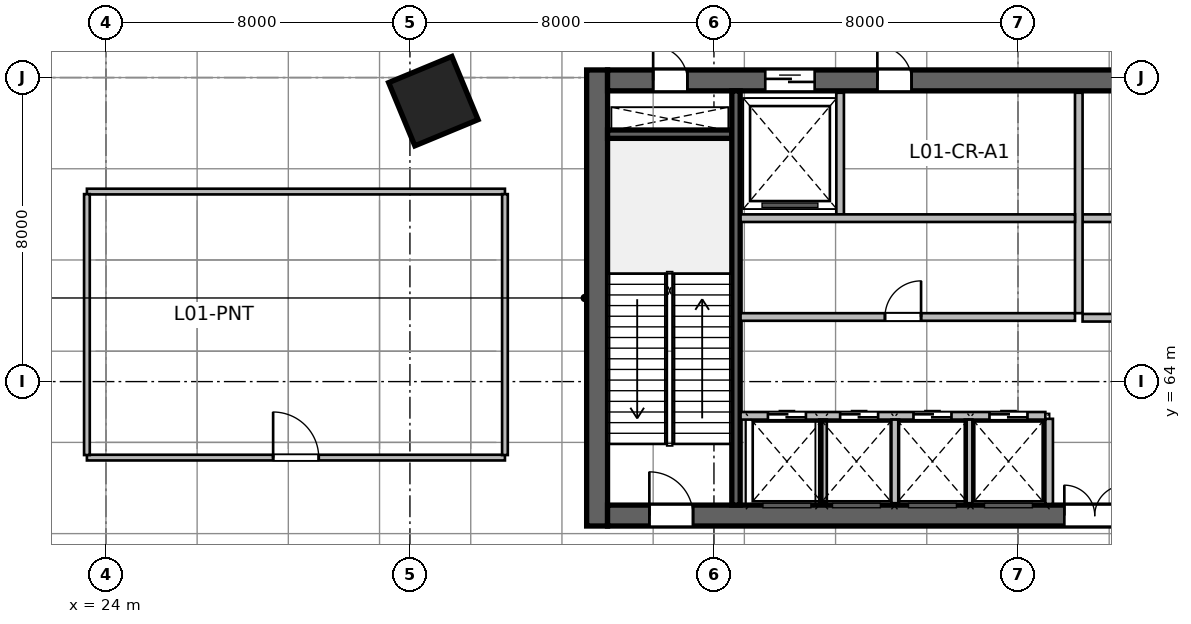
"""IFC4 building model, lengths in metres.
Left out: names, types, materials, properties, quantities, classifications, styles, units other than length and angle.
Written with IfcOpenShell. Run it as: python <this file> out.ifc"""

import sys

from ifc_helpers import new_model, si_unit, direction, frame, frame_2d, origin, origin_2d, place, context, subcontext, project, spatial, rectangle, extrude, source, transform, mapped, element, fill, save


model = new_model("IFC4")
c1 = context("Model", 3, precision=1e-05, world=origin(), true_north=direction((0.0, 1.0)))
c2 = subcontext(c1, "Body", "Model", "MODEL_VIEW")
j1 = project(units=[si_unit("LENGTHUNIT", "METRE"), si_unit("PLANEANGLEUNIT", "RADIAN")], contexts=[c1])
p1 = place(None, origin())
s1 = spatial("IfcSite", under=j1, at=p1, CompositionType="ELEMENT")
p2 = place(p1, origin())
s2 = spatial("IfcBuilding", under=s1, at=p2, CompositionType="ELEMENT")
p3 = place(p2, frame((0.0, 0.0, 6.0)))
s3 = spatial("IfcBuildingStorey", under=s2, at=p3, CompositionType="ELEMENT", Elevation=6.0)
m1 = source(origin(), c2, "Body", "SweptSolid", [
    extrude(rectangle(XDim=12.0, YDim=0.55, at=frame_2d((6.0, 0.0))), origin(), (0.0, 0.0, 1.0), 6.0),
])
p4 = place(p3, frame((36.925, 60.2, 0.0), z_axis=(0.0, 0.0, 1.0), x_axis=(0.0, 1.0, 0.0)))
e1 = element("IfcWall", 1, at=p4, inside=s3, PredefinedType="SHEAR", context=c2, shape_type="MappedRepresentation", body=[
    mapped(m1, transform((0.0, 0.0, 0.0), scale=1.0)),
])
m2 = source(origin(), c2, "Body", "SweptSolid", [
    extrude(rectangle(XDim=21.6, YDim=0.55, at=frame_2d((10.8, 0.0))), origin(), (0.0, 0.0, 1.0), 6.0),
])
p5 = place(p3, frame((37.2, 60.475, 0.0), z_axis=(0.0, 0.0, 1.0), x_axis=(1.0, 0.0, 0.0)))
e2 = element("IfcWall", 2, at=p5, inside=s3, PredefinedType="SHEAR", context=c2, shape_type="MappedRepresentation", body=[
    mapped(m2, transform((0.0, 0.0, 0.0), scale=1.0)),
])
p6 = place(p5, frame((1.1, 0.0, 0.0)))
e3 = element("IfcOpeningElement", 3, at=p6, cuts=e2, PredefinedType="OPENING", context=c2, shape_type="SweptSolid", body=[
    extrude(rectangle(XDim=1.15, YDim=2.15, at=frame_2d((0.575, 1.075))), frame((0.0, 0.285, 0.0), z_axis=(0.0, -1.0, 0.0), x_axis=(1.0, 0.0, 0.0)), (0.0, 0.0, 1.0), 0.57),
])
p7 = place(p5, frame((19.5, 0.0, 0.0)))
e4 = element("IfcOpeningElement", 4, at=p7, cuts=e2, PredefinedType="OPENING", context=c2, shape_type="SweptSolid", body=[
    extrude(rectangle(XDim=0.9, YDim=2.1, at=frame_2d((0.45, 1.05))), frame((0.0, 0.285, 0.0), z_axis=(0.0, -1.0, 0.0), x_axis=(1.0, 0.0, 0.0)), (0.0, 0.0, 1.0), 0.57),
])
p8 = place(p5, frame((12.02, 0.0, 0.0)))
e5 = element("IfcOpeningElement", 5, at=p8, cuts=e2, PredefinedType="OPENING", context=c2, shape_type="SweptSolid", body=[
    extrude(rectangle(XDim=1.6, YDim=2.15, at=frame_2d((0.8, 1.075))), frame((0.0, 0.285, 0.0), z_axis=(0.0, -1.0, 0.0), x_axis=(1.0, 0.0, 0.0)), (0.0, 0.0, 1.0), 0.57),
])
p9 = place(p3, frame((37.2, 71.925, 0.0), z_axis=(0.0, 0.0, 1.0), x_axis=(1.0, 0.0, 0.0)))
e6 = element("IfcWall", 6, at=p9, inside=s3, PredefinedType="SHEAR", context=c2, shape_type="MappedRepresentation", body=[
    mapped(m2, transform((0.0, 0.0, 0.0), scale=1.0)),
])
p10 = place(p9, frame((1.2, 0.0, 0.0)))
e7 = element("IfcOpeningElement", 7, at=p10, cuts=e6, PredefinedType="OPENING", context=c2, shape_type="SweptSolid", body=[
    extrude(rectangle(XDim=0.9, YDim=2.1, at=frame_2d((0.45, 1.05))), frame((0.0, 0.285, 0.0), z_axis=(0.0, -1.0, 0.0), x_axis=(1.0, 0.0, 0.0)), (0.0, 0.0, 1.0), 0.57),
])
p11 = place(p9, frame((14.7, 0.0, 0.0)))
e8 = element("IfcOpeningElement", 8, at=p11, cuts=e6, PredefinedType="OPENING", context=c2, shape_type="SweptSolid", body=[
    extrude(rectangle(XDim=1.2, YDim=2.15, at=frame_2d((0.6, 1.075))), frame((0.0, 0.285, 0.0), z_axis=(0.0, -1.0, 0.0), x_axis=(1.0, 0.0, 0.0)), (0.0, 0.0, 1.0), 0.57),
])
p12 = place(p9, frame((4.15, 0.0, 0.0)))
e9 = element("IfcOpeningElement", 9, at=p12, cuts=e6, PredefinedType="OPENING", context=c2, shape_type="SweptSolid", body=[
    extrude(rectangle(XDim=1.3, YDim=2.15, at=frame_2d((0.65, 1.075))), frame((0.0, 0.285, 0.0), z_axis=(0.0, -1.0, 0.0), x_axis=(1.0, 0.0, 0.0)), (0.0, 0.0, 1.0), 0.57),
])
p13 = place(p9, frame((7.1, 0.0, 0.0)))
e10 = element("IfcOpeningElement", 10, at=p13, cuts=e6, PredefinedType="OPENING", context=c2, shape_type="SweptSolid", body=[
    extrude(rectangle(XDim=0.9, YDim=2.1, at=frame_2d((0.45, 1.05))), frame((0.0, 0.285, 0.0), z_axis=(0.0, -1.0, 0.0), x_axis=(1.0, 0.0, 0.0)), (0.0, 0.0, 1.0), 0.57),
])
m3 = source(origin(), c2, "Body", "SweptSolid", [
    extrude(rectangle(XDim=3.27, YDim=0.22, at=frame_2d((1.635, 0.0))), origin(), (0.0, 0.0, 1.0), 6.0),
])
p14 = place(p3, frame((37.2, 70.51, 0.0), z_axis=(0.0, 0.0, 1.0), x_axis=(1.0, 0.0, 0.0)))
e11 = element("IfcWall", 11, at=p14, inside=s3, PredefinedType="SHEAR", context=c2, shape_type="MappedRepresentation", body=[
    mapped(m3, transform((0.0, 0.0, 0.0), scale=1.0)),
])
m4 = source(origin(), c2, "Body", "SweptSolid", [
    extrude(rectangle(XDim=10.9, YDim=0.22, at=frame_2d((5.45, 0.0))), origin(), (0.0, 0.0, 1.0), 6.0),
])
p15 = place(p3, frame((40.58, 60.75, 0.0), z_axis=(0.0, 0.0, 1.0), x_axis=(0.0, 1.0, 0.0)))
e12 = element("IfcWall", 12, at=p15, inside=s3, PredefinedType="SHEAR", context=c2, shape_type="MappedRepresentation", body=[
    mapped(m4, transform((0.0, 0.0, 0.0), scale=1.0)),
])
m5 = source(origin(), c2, "Body", "SweptSolid", [
    extrude(rectangle(XDim=1.8, YDim=1.8, at=origin_2d()), origin(), (0.0, 0.0, 1.0), 6.0),
])
p16 = place(p3, frame((32.616, 71.379, 0.0), z_axis=(0.0, 0.0, 1.0), x_axis=(-0.382683432365, 0.923879532511, 0.0)))
e13 = element("IfcColumn", 13, at=p16, inside=s3, PredefinedType="COLUMN", context=c2, shape_type="MappedRepresentation", body=[
    mapped(m5, transform((0.0, 0.0, 0.0), scale=1.0)),
])
m6 = source(origin(), c2, "Body", "SweptSolid", [
    extrude(rectangle(XDim=5.667, YDim=0.35, at=frame_2d((2.833, 0.0))), origin(), (0.0, 0.0, 1.0), 5.7),
])
p17 = place(p3, frame((25.25, 74.909, 0.0), z_axis=(0.0, 0.0, 1.0), x_axis=(-0.873233089296, -0.487302751642, 0.0)))
e14 = element("IfcWall", 14, at=p17, inside=s3, PredefinedType="SOLIDWALL", context=c2, shape_type="MappedRepresentation", body=[
    mapped(m6, transform((0.0, 0.0, 0.0), scale=1.0)),
])
p18 = place(p17, frame((1.033, 0.0, 1.05)))
e15 = element("IfcOpeningElement", 15, at=p18, cuts=e14, PredefinedType="OPENING", context=c2, shape_type="SweptSolid", body=[
    extrude(rectangle(XDim=3.6, YDim=2.8, at=frame_2d((1.8, 1.4))), frame((0.0, 0.185, 0.0), z_axis=(0.0, -1.0, 0.0), x_axis=(1.0, 0.0, 0.0)), (0.0, 0.0, 1.0), 0.37),
])
m7 = source(origin(), c2, "Body", "SweptSolid", [
    extrude(rectangle(XDim=2.24, YDim=0.2, at=frame_2d((1.12, 0.0))), origin(), (0.0, 0.0, 1.0), 5.7),
])
p19 = place(p3, frame((48.82, 60.78, 0.0), z_axis=(0.0, 0.0, 1.0), x_axis=(0.0, 1.0, 0.0)))
e16 = element("IfcWall", 16, at=p19, inside=s3, PredefinedType="SOLIDWALL", context=c2, shape_type="MappedRepresentation", body=[
    mapped(m7, transform((0.0, 0.0, 0.0), scale=1.0)),
])
m8 = source(origin(), c2, "Body", "SweptSolid", [
    extrude(rectangle(XDim=5.62, YDim=0.2, at=frame_2d((2.81, 0.0))), origin(), (0.0, 0.0, 1.0), 5.7),
])
p20 = place(p3, frame((49.7, 68.3, 0.0), z_axis=(0.0, 0.0, 1.0), x_axis=(1.0, 0.0, 0.0)))
e17 = element("IfcWall", 17, at=p20, inside=s3, PredefinedType="SOLIDWALL", context=c2, shape_type="MappedRepresentation", body=[
    mapped(m8, transform((0.0, 0.0, 0.0), scale=1.0)),
])
p21 = place(p20, frame((1.6, 0.0, 0.0)))
e18 = element("IfcOpeningElement", 18, at=p21, cuts=e17, PredefinedType="OPENING", context=c2, shape_type="SweptSolid", body=[
    extrude(rectangle(XDim=1.1, YDim=2.15, at=frame_2d((0.55, 1.075))), frame((0.0, 0.11, 0.0), z_axis=(0.0, -1.0, 0.0), x_axis=(1.0, 0.0, 0.0)), (0.0, 0.0, 1.0), 0.22),
])
p22 = place(p20, frame((3.7, 0.0, 0.0)))
e19 = element("IfcOpeningElement", 19, at=p22, cuts=e17, PredefinedType="OPENING", context=c2, shape_type="SweptSolid", body=[
    extrude(rectangle(XDim=1.1, YDim=2.15, at=frame_2d((0.55, 1.075))), frame((0.0, 0.11, 0.0), z_axis=(0.0, -1.0, 0.0), x_axis=(1.0, 0.0, 0.0)), (0.0, 0.0, 1.0), 0.22),
])
m9 = source(origin(), c2, "Body", "SweptSolid", [
    extrude(rectangle(XDim=5.8, YDim=0.2, at=frame_2d((2.9, 0.0))), origin(), (0.0, 0.0, 1.0), 5.7),
])
p23 = place(p3, frame((49.6, 65.8, 0.0), z_axis=(0.0, 0.0, 1.0), x_axis=(0.0, 1.0, 0.0)))
e20 = element("IfcWall", 20, at=p23, inside=s3, PredefinedType="SOLIDWALL", context=c2, shape_type="MappedRepresentation", body=[
    mapped(m9, transform((0.0, 0.0, 0.0), scale=1.0)),
])
p24 = place(p3, frame((49.7, 65.68, 0.0), z_axis=(0.0, 0.0, 1.0), x_axis=(1.0, 0.0, 0.0)))
e21 = element("IfcWall", 21, at=p24, inside=s3, PredefinedType="SOLIDWALL", context=c2, shape_type="MappedRepresentation", body=[
    mapped(m8, transform((0.0, 0.0, 0.0), scale=1.0)),
])
m10 = source(origin(), c2, "Body", "SweptSolid", [
    extrude(rectangle(XDim=3.2, YDim=0.2, at=frame_2d((1.6, 0.0))), origin(), (0.0, 0.0, 1.0), 5.7),
])
p25 = place(p3, frame((43.32, 68.4, 0.0), z_axis=(0.0, 0.0, 1.0), x_axis=(0.0, 1.0, 0.0)))
e22 = element("IfcWall", 22, at=p25, inside=s3, PredefinedType="SOLIDWALL", context=c2, shape_type="MappedRepresentation", body=[
    mapped(m10, transform((0.0, 0.0, 0.0), scale=1.0)),
])
m11 = source(origin(), c2, "Body", "SweptSolid", [
    extrude(rectangle(XDim=8.8, YDim=0.2, at=frame_2d((4.4, 0.0))), origin(), (0.0, 0.0, 1.0), 5.7),
])
p26 = place(p3, frame((40.7, 68.3, 0.0), z_axis=(0.0, 0.0, 1.0), x_axis=(1.0, 0.0, 0.0)))
e23 = element("IfcWall", 23, at=p26, inside=s3, PredefinedType="SOLIDWALL", context=c2, shape_type="MappedRepresentation", body=[
    mapped(m11, transform((0.0, 0.0, 0.0), scale=1.0)),
])
m12 = source(origin(), c2, "Body", "SweptSolid", [
    extrude(rectangle(XDim=8.02, YDim=0.2, at=frame_2d((4.01, 0.0))), origin(), (0.0, 0.0, 1.0), 5.7),
])
p27 = place(p3, frame((40.7, 63.1, 0.0), z_axis=(0.0, 0.0, 1.0), x_axis=(1.0, 0.0, 0.0)))
e24 = element("IfcWall", 24, at=p27, inside=s3, PredefinedType="SOLIDWALL", context=c2, shape_type="MappedRepresentation", body=[
    mapped(m12, transform((0.0, 0.0, 0.0), scale=1.0)),
])
p28 = place(p27, frame((0.72, 0.0, 0.0)))
e25 = element("IfcOpeningElement", 25, at=p28, cuts=e24, PredefinedType="OPENING", context=c2, shape_type="SweptSolid", body=[
    extrude(rectangle(XDim=1.0, YDim=2.15, at=frame_2d((0.5, 1.075))), frame((0.0, 0.11, 0.0), z_axis=(0.0, -1.0, 0.0), x_axis=(1.0, 0.0, 0.0)), (0.0, 0.0, 1.0), 0.22),
])
p29 = place(p27, frame((2.62, 0.0, 0.0)))
e26 = element("IfcOpeningElement", 26, at=p29, cuts=e24, PredefinedType="OPENING", context=c2, shape_type="SweptSolid", body=[
    extrude(rectangle(XDim=1.0, YDim=2.15, at=frame_2d((0.5, 1.075))), frame((0.0, 0.11, 0.0), z_axis=(0.0, -1.0, 0.0), x_axis=(1.0, 0.0, 0.0)), (0.0, 0.0, 1.0), 0.22),
])
p30 = place(p27, frame((4.55, 0.0, 0.0)))
e27 = element("IfcOpeningElement", 27, at=p30, cuts=e24, PredefinedType="OPENING", context=c2, shape_type="SweptSolid", body=[
    extrude(rectangle(XDim=1.0, YDim=2.15, at=frame_2d((0.5, 1.075))), frame((0.0, 0.11, 0.0), z_axis=(0.0, -1.0, 0.0), x_axis=(1.0, 0.0, 0.0)), (0.0, 0.0, 1.0), 0.22),
])
p31 = place(p27, frame((6.55, 0.0, 0.0)))
e28 = element("IfcOpeningElement", 28, at=p31, cuts=e24, PredefinedType="OPENING", context=c2, shape_type="SweptSolid", body=[
    extrude(rectangle(XDim=1.0, YDim=2.15, at=frame_2d((0.5, 1.075))), frame((0.0, 0.11, 0.0), z_axis=(0.0, -1.0, 0.0), x_axis=(1.0, 0.0, 0.0)), (0.0, 0.0, 1.0), 0.22),
])
m13 = source(origin(), c2, "Body", "SweptSolid", [
    extrude(rectangle(XDim=2.2, YDim=0.2, at=frame_2d((1.1, 0.0))), origin(), (0.0, 0.0, 1.0), 5.7),
])
for number, where, z_axis, x_axis in (
    (29, (42.87, 60.8, 0.0), (0.0, 0.0, 1.0), (0.0, 1.0, 0.0)),
    (30, (44.77, 60.8, 0.0), (0.0, 0.0, 1.0), (0.0, 1.0, 0.0)),
    (31, (46.7, 60.8, 0.0), (0.0, 0.0, 1.0), (0.0, 1.0, 0.0)),
):
    element("IfcWall", number, at=place(p3, frame(where, z_axis=z_axis, x_axis=x_axis)), inside=s3, PredefinedType="SOLIDWALL", context=c2, shape_type="MappedRepresentation", body=[
        mapped(m13, transform((0.0, 0.0, 0.0), scale=1.0)),
    ])
p32 = place(p3, frame((40.7, 65.7, 0.0), z_axis=(0.0, 0.0, 1.0), x_axis=(1.0, 0.0, 0.0)))
e32 = element("IfcWall", 32, at=p32, inside=s3, PredefinedType="SOLIDWALL", context=c2, shape_type="MappedRepresentation", body=[
    mapped(m11, transform((0.0, 0.0, 0.0), scale=1.0)),
])
p33 = place(p32, frame((3.8, 0.0, 0.0)))
e33 = element("IfcOpeningElement", 33, at=p33, cuts=e32, PredefinedType="OPENING", context=c2, shape_type="SweptSolid", body=[
    extrude(rectangle(XDim=0.95, YDim=2.15, at=frame_2d((0.475, 1.075))), frame((0.0, 0.11, 0.0), z_axis=(0.0, -1.0, 0.0), x_axis=(1.0, 0.0, 0.0)), (0.0, 0.0, 1.0), 0.22),
])
m14 = source(origin(), c2, "Body", "SweptSolid", [
    extrude(rectangle(XDim=11.0, YDim=0.15, at=frame_2d((5.5, 0.0))), origin(), (0.0, 0.0, 1.0), 5.7),
])
p34 = place(p3, frame((23.5, 62.0, 0.0), z_axis=(0.0, 0.0, 1.0), x_axis=(1.0, 0.0, 0.0)))
e34 = element("IfcWall", 34, at=p34, inside=s3, PredefinedType="PARTITIONING", context=c2, shape_type="MappedRepresentation", body=[
    mapped(m14, transform((0.0, 0.0, 0.0), scale=1.0)),
])
p35 = place(p34, frame((4.9, 0.0, 0.0)))
e35 = element("IfcOpeningElement", 35, at=p35, cuts=e34, PredefinedType="OPENING", context=c2, shape_type="SweptSolid", body=[
    extrude(rectangle(XDim=1.2, YDim=2.15, at=frame_2d((0.6, 1.075))), frame((0.0, 0.085, 0.0), z_axis=(0.0, -1.0, 0.0), x_axis=(1.0, 0.0, 0.0)), (0.0, 0.0, 1.0), 0.17),
])
m15 = source(origin(), c2, "Body", "SweptSolid", [
    extrude(rectangle(XDim=11.0, YDim=0.15, at=frame_2d((5.5, 0.0))), origin(), (0.0, 0.0, 1.0), 4.761),
])
p36 = place(p3, frame((23.5, 69.0, 0.0), z_axis=(0.0, 0.0, 1.0), x_axis=(1.0, 0.0, 0.0)))
e36 = element("IfcWall", 36, at=p36, inside=s3, PredefinedType="PARTITIONING", context=c2, shape_type="MappedRepresentation", body=[
    mapped(m15, transform((0.0, 0.0, 0.0), scale=1.0)),
])
m16 = source(origin(), c2, "Body", "SweptSolid", [
    extrude(rectangle(XDim=6.865, YDim=0.15, at=frame_2d((3.433, 0.0))), origin(), (0.0, 0.0, 1.0), 5.7),
])
for number, where, z_axis, x_axis in (
    (37, (23.5, 62.067, 0.0), (0.0, 0.0, 1.0), (0.0, 1.0, 0.0)),
    (38, (34.5, 62.067, 0.0), (0.0, 0.0, 1.0), (0.0, 1.0, 0.0)),
):
    element("IfcWall", number, at=place(p3, frame(where, z_axis=z_axis, x_axis=x_axis)), inside=s3, PredefinedType="PARTITIONING", context=c2, shape_type="MappedRepresentation", body=[
        mapped(m16, transform((0.0, 0.0, 0.0), scale=1.0)),
    ])
m17 = source(origin(), c2, "Body", "SweptSolid", [
    extrude(rectangle(XDim=3.6, YDim=2.8, at=frame_2d((1.8, 1.4))), frame((0.0, 0.03, 0.0), z_axis=(0.0, -1.0, 0.0), x_axis=(1.0, 0.0, 0.0)), (0.0, 0.0, 1.0), 0.06),
])
p37 = place(p18, origin())
e39 = element("IfcWindow", 39, at=p37, inside=s3, PartitioningType="TRIPLE_PANEL_VERTICAL", PredefinedType="WINDOW", context=c2, shape_type="MappedRepresentation", body=[
    mapped(m17, transform((0.0, 0.0, 0.0), scale=1.0)),
])
fill(e15, e39)
m18 = source(origin(), c2, "Body", "SweptSolid", [
    extrude(rectangle(XDim=1.15, YDim=2.15, at=frame_2d((0.575, 1.075))), frame((0.0, 0.025, 0.0), z_axis=(0.0, -1.0, 0.0), x_axis=(1.0, 0.0, 0.0)), (0.0, 0.0, 1.0), 0.05),
])
p38 = place(p6, origin())
e40 = element("IfcDoor", 40, at=p38, inside=s3, OperationType="SINGLE_SWING_LEFT", PredefinedType="DOOR", context=c2, shape_type="MappedRepresentation", body=[
    mapped(m18, transform((0.0, 0.0, 0.0), scale=1.0)),
])
fill(e3, e40)
m19 = source(origin(), c2, "Body", "SweptSolid", [
    extrude(rectangle(XDim=0.9, YDim=2.1, at=frame_2d((0.45, 1.05))), frame((0.0, 0.025, 0.0), z_axis=(0.0, -1.0, 0.0), x_axis=(1.0, 0.0, 0.0)), (0.0, 0.0, 1.0), 0.05),
])
p39 = place(p10, origin())
e41 = element("IfcDoor", 41, at=p39, inside=s3, OperationType="SINGLE_SWING_LEFT", PredefinedType="DOOR", context=c2, shape_type="MappedRepresentation", body=[
    mapped(m19, transform((0.0, 0.0, 0.0), scale=1.0)),
])
fill(e7, e41)
m20 = source(origin(), c2, "Body", "SweptSolid", [
    extrude(rectangle(XDim=1.6, YDim=2.15, at=frame_2d((0.8, 1.075))), frame((0.0, 0.025, 0.0), z_axis=(0.0, -1.0, 0.0), x_axis=(1.0, 0.0, 0.0)), (0.0, 0.0, 1.0), 0.05),
])
p40 = place(p8, origin())
e42 = element("IfcDoor", 42, at=p40, inside=s3, OperationType="DOUBLE_DOOR_SINGLE_SWING", PredefinedType="DOOR", context=c2, shape_type="MappedRepresentation", body=[
    mapped(m20, transform((0.0, 0.0, 0.0), scale=1.0)),
])
fill(e5, e42)
m21 = source(origin(), c2, "Body", "SweptSolid", [
    extrude(rectangle(XDim=1.3, YDim=2.15, at=frame_2d((0.65, 1.075))), frame((0.0, 0.025, 0.0), z_axis=(0.0, -1.0, 0.0), x_axis=(1.0, 0.0, 0.0)), (0.0, 0.0, 1.0), 0.05),
])
p41 = place(p12, origin())
e43 = element("IfcDoor", 43, at=p41, inside=s3, OperationType="DOUBLE_DOOR_SLIDING", PredefinedType="DOOR", context=c2, shape_type="MappedRepresentation", body=[
    mapped(m21, transform((0.0, 0.0, 0.0), scale=1.0)),
])
fill(e9, e43)
p42 = place(p13, origin())
e44 = element("IfcDoor", 44, at=p42, inside=s3, OperationType="SINGLE_SWING_LEFT", PredefinedType="DOOR", context=c2, shape_type="MappedRepresentation", body=[
    mapped(m19, transform((0.0, 0.0, 0.0), scale=1.0)),
])
fill(e10, e44)
m22 = source(origin(), c2, "Body", "SweptSolid", [
    extrude(rectangle(XDim=1.0, YDim=2.15, at=frame_2d((0.5, 1.075))), frame((0.0, 0.025, 0.0), z_axis=(0.0, -1.0, 0.0), x_axis=(1.0, 0.0, 0.0)), (0.0, 0.0, 1.0), 0.05),
])
p43 = place(p28, origin())
e45 = element("IfcDoor", 45, at=p43, inside=s3, OperationType="DOUBLE_DOOR_SLIDING", PredefinedType="DOOR", context=c2, shape_type="MappedRepresentation", body=[
    mapped(m22, transform((0.0, 0.0, 0.0), scale=1.0)),
])
fill(e25, e45)
p44 = place(p29, origin())
e46 = element("IfcDoor", 46, at=p44, inside=s3, OperationType="DOUBLE_DOOR_SLIDING", PredefinedType="DOOR", context=c2, shape_type="MappedRepresentation", body=[
    mapped(m22, transform((0.0, 0.0, 0.0), scale=1.0)),
])
fill(e26, e46)
p45 = place(p30, origin())
e47 = element("IfcDoor", 47, at=p45, inside=s3, OperationType="DOUBLE_DOOR_SLIDING", PredefinedType="DOOR", context=c2, shape_type="MappedRepresentation", body=[
    mapped(m22, transform((0.0, 0.0, 0.0), scale=1.0)),
])
fill(e27, e47)
p46 = place(p31, origin())
e48 = element("IfcDoor", 48, at=p46, inside=s3, OperationType="DOUBLE_DOOR_SLIDING", PredefinedType="DOOR", context=c2, shape_type="MappedRepresentation", body=[
    mapped(m22, transform((0.0, 0.0, 0.0), scale=1.0)),
])
fill(e28, e48)
m23 = source(origin(), c2, "Body", "SweptSolid", [
    extrude(rectangle(XDim=0.95, YDim=2.15, at=frame_2d((0.475, 1.075))), frame((0.0, 0.025, 0.0), z_axis=(0.0, -1.0, 0.0), x_axis=(1.0, 0.0, 0.0)), (0.0, 0.0, 1.0), 0.05),
])
p47 = place(p33, origin())
e49 = element("IfcDoor", 49, at=p47, inside=s3, OperationType="SINGLE_SWING_RIGHT", PredefinedType="DOOR", context=c2, shape_type="MappedRepresentation", body=[
    mapped(m23, transform((0.0, 0.0, 0.0), scale=1.0)),
])
fill(e33, e49)
m24 = source(origin(), c2, "Body", "SweptSolid", [
    extrude(rectangle(XDim=1.2, YDim=2.15, at=frame_2d((0.6, 1.075))), frame((0.0, 0.025, 0.0), z_axis=(0.0, -1.0, 0.0), x_axis=(1.0, 0.0, 0.0)), (0.0, 0.0, 1.0), 0.05),
])
p48 = place(p35, origin())
e50 = element("IfcDoor", 50, at=p48, inside=s3, OperationType="SINGLE_SWING_LEFT", PredefinedType="DOOR", context=c2, shape_type="MappedRepresentation", body=[
    mapped(m24, transform((0.0, 0.0, 0.0), scale=1.0)),
])
fill(e35, e50)
save(model, sys.argv[1])
